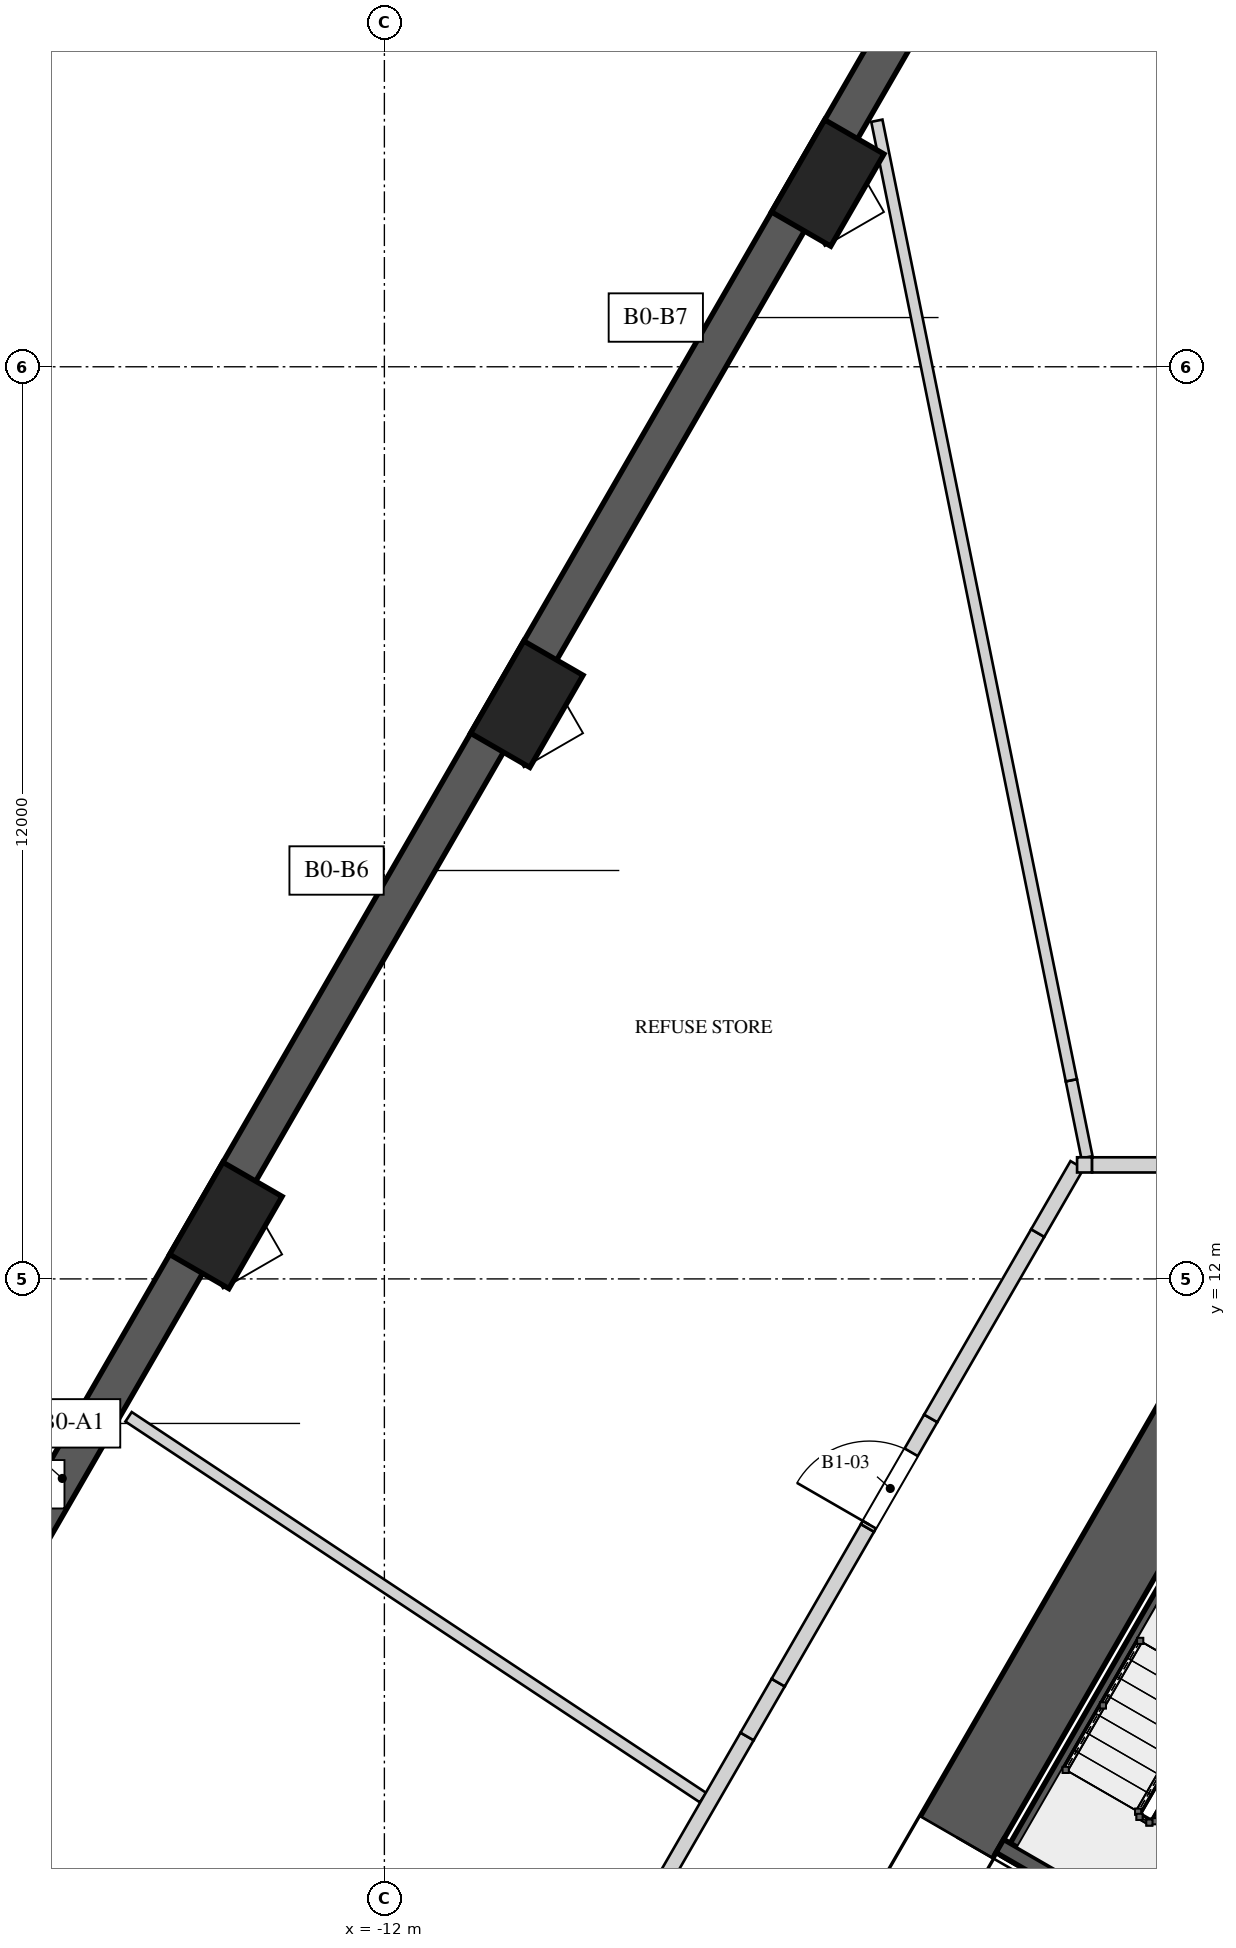
"""IFC4 building model, lengths in metres.
Left out: names, types, materials, properties, quantities, classifications, styles, units other than length and angle.
Written with IfcOpenShell. Run it as: python <this file> out.ifc"""

import sys

from ifc_helpers import new_model, si_unit, direction, frame, frame_2d, origin, origin_2d, place, context, subcontext, project, spatial, polyline, rectangle, outline, extrude, element, fill, save


model = new_model("IFC4")
c1 = context("Model", 3, precision=1e-05, world=origin(), true_north=direction((0.0, 1.0)))
c2 = subcontext(c1, "Body", "Model", "MODEL_VIEW")
j1 = project(units=[si_unit("LENGTHUNIT", "METRE"), si_unit("PLANEANGLEUNIT", "RADIAN")], contexts=[c1])
p1 = place(None, origin())
s1 = spatial("IfcSite", under=j1, at=p1, CompositionType="ELEMENT")
p2 = place(p1, origin())
s2 = spatial("IfcBuilding", under=s1, at=p2, CompositionType="ELEMENT")
p3 = place(p2, frame((0.0, 0.0, -5.0)))
s3 = spatial("IfcBuildingStorey", under=s2, at=p3, CompositionType="ELEMENT", Elevation=-5.0)
p4 = place(p3, frame((-2.454, 33.25, -0.3), z_axis=(0.0, 0.0, 1.0), x_axis=(-0.500001743317, -0.866024397277, 0.0)))
e1 = element("IfcWall", 1, at=p4, inside=s3, PredefinedType="SHEAR", context=c2, shape_type="SweptSolid", body=[
    extrude(rectangle(XDim=55.137, YDim=0.5, at=frame_2d((27.568, 0.0))), origin(), (0.0, 0.0, 1.0), 5.3),
])
p5 = place(p3, frame((-1.126, 10.45, -0.3), z_axis=(0.0, 0.0, 1.0), x_axis=(-0.500001757713, -0.866024388966, 0.0)))
e2 = element("IfcWall", 2, at=p5, inside=s3, PredefinedType="SHEAR", context=c2, shape_type="SweptSolid", body=[
    extrude(rectangle(XDim=16.974, YDim=1.1, at=frame_2d((8.487, 0.0))), origin(), (0.0, 0.0, 1.0), 5.3),
])
p6 = place(p5, frame((6.692, 0.0, 0.3)))
e3 = element("IfcOpeningElement", 3, at=p6, cuts=e2, PredefinedType="OPENING", context=c2, shape_type="SweptSolid", body=[
    extrude(rectangle(XDim=1.0, YDim=2.4, at=frame_2d((0.5, 1.2))), frame((0.0, 0.56, 0.0), z_axis=(0.0, -1.0, 0.0), x_axis=(1.0, 0.0, 0.0)), (0.0, 0.0, 1.0), 1.12),
])
p7 = place(p5, frame((14.397, 0.0, 0.3)))
e4 = element("IfcOpeningElement", 4, at=p7, cuts=e2, PredefinedType="OPENING", context=c2, shape_type="SweptSolid", body=[
    extrude(rectangle(XDim=0.8, YDim=2.1, at=frame_2d((0.4, 1.05))), frame((0.0, 0.56, 0.0), z_axis=(0.0, -1.0, 0.0), x_axis=(1.0, 0.0, 0.0)), (0.0, 0.0, 1.0), 1.12),
])
for number, where, z_axis, x_axis in (
    (5, (-6.167, 26.418, -0.3), (0.0, 0.0, 1.0), (-0.5, -0.866, 0.0)),
    (6, (-10.126, 19.561, -0.3), (0.0, 0.0, 1.0), (-0.5, -0.866, 0.0)),
    (7, (-14.085, 12.704, -0.3), (0.0, 0.0, 1.0), (-0.5, -0.866, 0.0)),
):
    element("IfcColumn", number, at=place(p3, frame(where, z_axis=z_axis, x_axis=x_axis)), inside=s3, PredefinedType="COLUMN", context=c2, shape_type="SweptSolid", body=[
        extrude(rectangle(XDim=1.4, YDim=0.9, at=origin_2d()), origin(), (0.0, 0.0, 1.0), 5.3),
    ])
p8 = place(p3, frame((-0.68, 9.722, 0.0), z_axis=(0.0, 0.0, 1.0), x_axis=(-0.49998037582, -0.866036733513, 0.0)))
e8 = element("IfcWall", 8, at=p8, inside=s3, PredefinedType="SOLIDWALL", context=c2, shape_type="SweptSolid", body=[
    extrude(rectangle(XDim=6.2, YDim=0.2, at=frame_2d((3.1, 0.0))), origin(), (0.0, 0.0, 1.0), 4.65),
])
p9 = place(p3, frame((-1.521, 3.165, 0.0), z_axis=(0.0, 0.0, 1.0), x_axis=(-0.866027397988, 0.499996545922, 0.0)))
e9 = element("IfcWall", 9, at=p9, inside=s3, PredefinedType="SOLIDWALL", context=c2, shape_type="SweptSolid", body=[
    extrude(rectangle(XDim=2.75, YDim=0.2, at=frame_2d((1.375, 0.0))), origin(), (0.0, 0.0, 1.0), 4.65),
])
p10 = place(p9, frame((0.725, 0.0, 0.0)))
e10 = element("IfcOpeningElement", 10, at=p10, cuts=e9, PredefinedType="OPENING", context=c2, shape_type="SweptSolid", body=[
    extrude(rectangle(XDim=1.1, YDim=2.4, at=frame_2d((0.55, 1.2))), frame((0.0, 0.11, 0.0), z_axis=(0.0, -1.0, 0.0), x_axis=(1.0, 0.0, 0.0)), (0.0, 0.0, 1.0), 0.22),
])
p11 = place(p3, frame((-7.808, 5.176, 0.0), z_axis=(0.0, 0.0, 1.0), x_axis=(-0.833484918625, 0.552542206917, 0.0)))
e11 = element("IfcWall", 11, at=p11, inside=s3, PredefinedType="PARTITIONING", context=c2, shape_type="SweptSolid", body=[
    extrude(rectangle(XDim=9.067, YDim=0.15, at=frame_2d((4.534, 0.0))), origin(), (0.0, 0.0, 1.0), 4.65),
])
p12 = place(p3, frame((-2.757, 13.6, 0.0), z_axis=(0.0, 0.0, 1.0), x_axis=(-0.198613380465, 0.980077917872, 0.0)))
e12 = element("IfcWall", 12, at=p12, inside=s3, PredefinedType="PARTITIONING", context=c2, shape_type="SweptSolid", body=[
    extrude(rectangle(XDim=1.034, YDim=0.15, at=frame_2d((0.517, 0.0))), origin(), (0.0, 0.0, 1.0), 3.55),
])
p13 = place(p3, frame((-2.962, 14.613, 0.0), z_axis=(0.0, 0.0, 1.0), x_axis=(-0.198681618369, 0.980064086947, 0.0)))
e13 = element("IfcWall", 13, at=p13, inside=s3, PredefinedType="PARTITIONING", context=c2, shape_type="SweptSolid", body=[
    extrude(rectangle(XDim=12.88, YDim=0.15, at=frame_2d((6.44, 0.0))), origin(), (0.0, 0.0, 1.0), 4.65),
])
p14 = place(p3, frame((-8.793, 3.27, 0.0), z_axis=(0.0, 0.0, 1.0), x_axis=(0.499947505232, 0.866055709532, 0.0)))
e14 = element("IfcWall", 14, at=p14, inside=s3, PredefinedType="SOLIDWALL", context=c2, shape_type="SweptSolid", body=[
    extrude(rectangle(XDim=3.13, YDim=0.2, at=frame_2d((1.565, 0.0))), origin(), (0.0, 0.0, 1.0), 4.65),
])
p15 = place(p3, frame((-7.228, 5.98, 0.0), z_axis=(0.0, 0.0, 1.0), x_axis=(0.500118501653, 0.865956976012, 0.0)))
e15 = element("IfcWall", 15, at=p15, inside=s3, PredefinedType="SOLIDWALL", context=c2, shape_type="SweptSolid", body=[
    extrude(rectangle(XDim=0.818, YDim=0.2, at=frame_2d((0.409, 0.0))), origin(), (0.0, 0.0, 1.0), 3.75),
])
p16 = place(p3, frame((-6.819, 6.689, 0.0), z_axis=(0.0, 0.0, 1.0), x_axis=(0.499995339376, 0.86602809458, 0.0)))
e16 = element("IfcWall", 16, at=p16, inside=s3, PredefinedType="SOLIDWALL", context=c2, shape_type="SweptSolid", body=[
    extrude(rectangle(XDim=2.349, YDim=0.2, at=frame_2d((1.175, 0.0))), origin(), (0.0, 0.0, 1.0), 4.65),
])
p17 = place(p3, frame((-5.645, 8.723, 0.0), z_axis=(0.0, 0.0, 1.0), x_axis=(0.500018619731, 0.866014653411, 0.0)))
e17 = element("IfcWall", 17, at=p17, inside=s3, PredefinedType="SOLIDWALL", context=c2, shape_type="SweptSolid", body=[
    extrude(outline(polyline([(0.0, 0.0), (1.665, 0.0), (1.665, 3.75), (0.715, 3.75), (0.715, 4.65), (0.0, 4.65), (0.0, 0.0)])), frame((0.0, 0.1, 0.0), z_axis=(0.0, -1.0, 0.0), x_axis=(1.0, 0.0, 0.0)), (0.0, 0.0, 1.0), 0.2),
])
p18 = place(p17, frame((0.05, 0.0, 0.0)))
e18 = element("IfcOpeningElement", 18, at=p18, cuts=e17, PredefinedType="OPENING", context=c2, shape_type="SweptSolid", body=[
    extrude(rectangle(XDim=1.1, YDim=2.4, at=frame_2d((0.55, 1.2))), frame((0.0, 0.11, 0.0), z_axis=(0.0, -1.0, 0.0), x_axis=(1.0, 0.0, 0.0)), (0.0, 0.0, 1.0), 0.22),
])
p19 = place(p3, frame((-4.812, 10.165, 0.0), z_axis=(0.0, 0.0, 1.0), x_axis=(0.500000186108, 0.866025296335, 0.0)))
e19 = element("IfcWall", 19, at=p19, inside=s3, PredefinedType="SOLIDWALL", context=c2, shape_type="SweptSolid", body=[
    extrude(rectangle(XDim=2.815, YDim=0.2, at=frame_2d((1.408, 0.0))), origin(), (0.0, 0.0, 1.0), 4.65),
])
p20 = place(p3, frame((-3.404, 12.604, 0.0), z_axis=(0.0, 0.0, 1.0), x_axis=(0.499994660107, 0.866028486751, 0.0)))
e20 = element("IfcWall", 20, at=p20, inside=s3, PredefinedType="SOLIDWALL", context=c2, shape_type="SweptSolid", body=[
    extrude(rectangle(XDim=1.035, YDim=0.2, at=frame_2d((0.518, 0.0))), origin(), (0.0, 0.0, 1.0), 3.55),
])
p21 = place(p3, frame((-2.887, 13.5, 0.0), z_axis=(0.0, 0.0, 1.0), x_axis=(1.0, 0.0, 0.0)))
e21 = element("IfcWall", 21, at=p21, inside=s3, PredefinedType="SOLIDWALL", context=c2, shape_type="SweptSolid", body=[
    extrude(rectangle(XDim=0.197, YDim=0.2, at=frame_2d((0.099, 0.0))), origin(), (0.0, 0.0, 1.0), 3.55),
])
p22 = place(p3, frame((-2.689, 13.5, 0.0), z_axis=(0.0, 0.0, 1.0), x_axis=(1.0, 0.0, 0.0)))
e22 = element("IfcWall", 22, at=p22, inside=s3, PredefinedType="SOLIDWALL", context=c2, shape_type="SweptSolid", body=[
    extrude(rectangle(XDim=1.267, YDim=0.2, at=frame_2d((0.633, 0.0))), origin(), (0.0, 0.0, 1.0), 4.65),
])
p23 = place(p6, origin())
e23 = element("IfcDoor", 23, at=p23, inside=s3, OperationType="SINGLE_SWING_LEFT", PredefinedType="DOOR", context=c2, shape_type="SweptSolid", body=[
    extrude(rectangle(XDim=1.0, YDim=2.4, at=frame_2d((0.5, 1.2))), frame((0.0, 0.025, 0.0), z_axis=(0.0, -1.0, 0.0), x_axis=(1.0, 0.0, 0.0)), (0.0, 0.0, 1.0), 0.05),
])
fill(e3, e23)
p24 = place(p18, origin())
e24 = element("IfcDoor", 24, at=p24, inside=s3, OperationType="SINGLE_SWING_LEFT", PredefinedType="DOOR", context=c2, shape_type="SweptSolid", body=[
    extrude(rectangle(XDim=1.1, YDim=2.4, at=frame_2d((0.55, 1.2))), frame((0.0, 0.025, 0.0), z_axis=(0.0, -1.0, 0.0), x_axis=(1.0, 0.0, 0.0)), (0.0, 0.0, 1.0), 0.05),
])
fill(e18, e24)
save(model, sys.argv[1])
